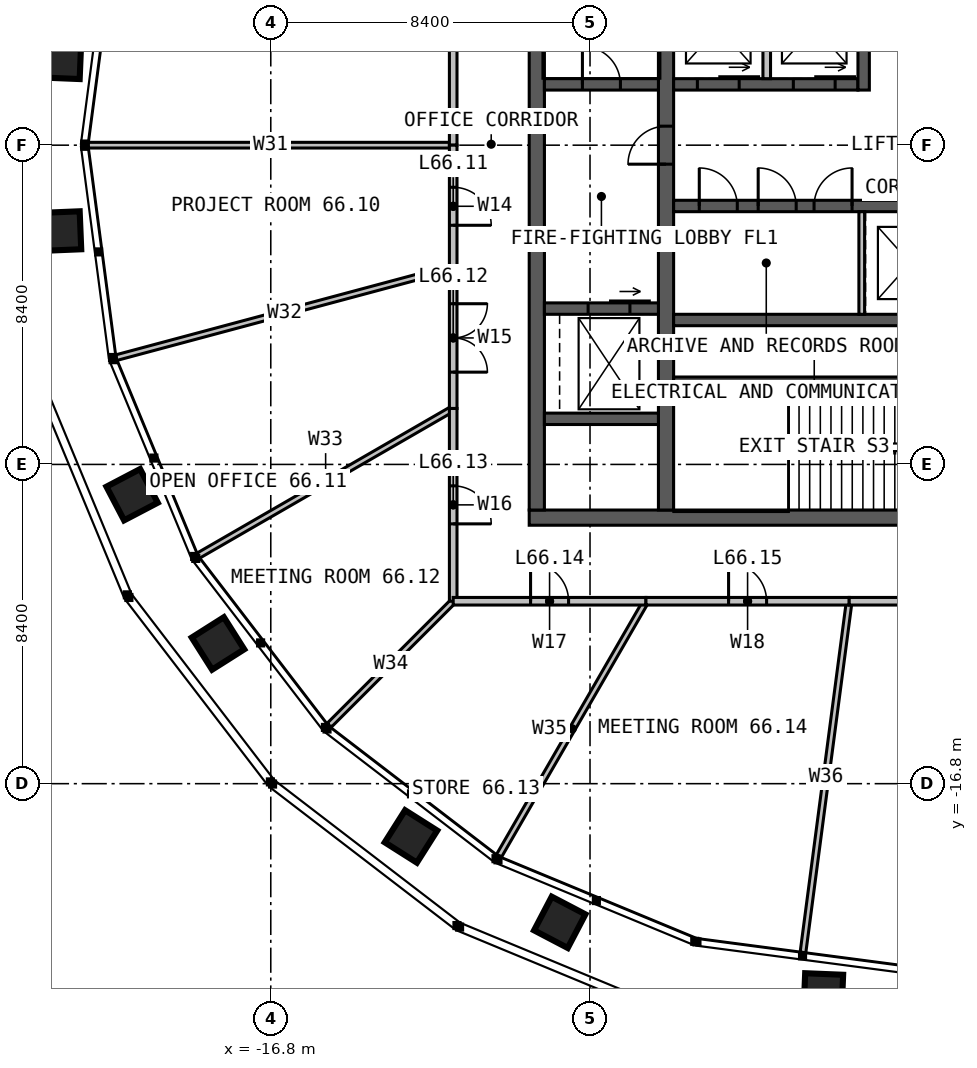
"""IFC4 building model, lengths in metres.
Left out: names, types, materials, properties, quantities, classifications, styles, units other than length and angle.
Written with IfcOpenShell. Run it as: python <this file> out.ifc"""

import sys

from ifc_helpers import new_model, si_unit, direction, frame, frame_2d, origin, place, context, subcontext, project, spatial, rectangle, extrude, element, fill, save


model = new_model("IFC4")
c1 = context("Model", 3, precision=1e-05, world=origin(), true_north=direction((0.0, 1.0)))
c2 = subcontext(c1, "Body", "Model", "MODEL_VIEW")
j1 = project(units=[si_unit("LENGTHUNIT", "METRE"), si_unit("PLANEANGLEUNIT", "RADIAN")], contexts=[c1])
p1 = place(None, origin())
s1 = spatial("IfcSite", under=j1, at=p1, CompositionType="ELEMENT")
p2 = place(p1, origin())
s2 = spatial("IfcBuilding", under=s1, at=p2, CompositionType="ELEMENT")
p3 = place(p2, frame((0.0, 0.0, 272.0)))
s3 = spatial("IfcBuildingStorey", under=s2, at=p3, CompositionType="ELEMENT", Elevation=272.0)
p4 = place(p3, frame((10.0, -9.8, 0.0), z_axis=(0.0, 0.0, 1.0), x_axis=(-1.0, 0.0, 0.0)))
e1 = element("IfcWall", 1, at=p4, inside=s3, PredefinedType="SOLIDWALL", context=c2, shape_type="SweptSolid", body=[
    extrude(rectangle(XDim=20.0, YDim=0.4, at=frame_2d((10.0, 0.0))), origin(), (0.0, 0.0, 1.0), 4.0),
])
p5 = place(p4, frame((6.875, 0.0, 0.0)))
e2 = element("IfcOpeningElement", 2, at=p5, cuts=e1, PredefinedType="OPENING", context=c2, shape_type="SweptSolid", body=[
    extrude(rectangle(XDim=1.2, YDim=2.2, at=frame_2d((0.6, 1.1))), frame((0.0, 0.21, 0.0), z_axis=(0.0, -1.0, 0.0), x_axis=(1.0, 0.0, 0.0)), (0.0, 0.0, 1.0), 0.42),
])
p6 = place(p3, frame((-9.8, 9.6, 0.0), z_axis=(0.0, 0.0, 1.0), x_axis=(0.0, -1.0, 0.0)))
e3 = element("IfcWall", 3, at=p6, inside=s3, PredefinedType="SOLIDWALL", context=c2, shape_type="SweptSolid", body=[
    extrude(rectangle(XDim=19.2, YDim=0.4, at=frame_2d((9.6, 0.0))), origin(), (0.0, 0.0, 1.0), 4.0),
])
p7 = place(p3, frame((-6.4, -9.6, 0.0), z_axis=(0.0, 0.0, 1.0), x_axis=(0.0, 1.0, 0.0)))
e4 = element("IfcWall", 4, at=p7, inside=s3, PredefinedType="SOLIDWALL", context=c2, shape_type="SweptSolid", body=[
    extrude(rectangle(XDim=19.2, YDim=0.4, at=frame_2d((9.6, 0.0))), origin(), (0.0, 0.0, 1.0), 4.0),
])
p8 = place(p7, frame((9.1, 0.0, 0.0)))
e5 = element("IfcOpeningElement", 5, at=p8, cuts=e4, PredefinedType="OPENING", context=c2, shape_type="SweptSolid", body=[
    extrude(rectangle(XDim=1.0, YDim=2.2, at=frame_2d((0.5, 1.1))), frame((0.0, 0.21, 0.0), z_axis=(0.0, -1.0, 0.0), x_axis=(1.0, 0.0, 0.0)), (0.0, 0.0, 1.0), 0.42),
])
p9 = place(p3, frame((-6.2, 1.6, 0.0), z_axis=(0.0, 0.0, 1.0), x_axis=(1.0, 0.0, 0.0)))
e6 = element("IfcWall", 6, at=p9, inside=s3, PredefinedType="SOLIDWALL", context=c2, shape_type="SweptSolid", body=[
    extrude(rectangle(XDim=4.85, YDim=0.3, at=frame_2d((2.425, 0.0))), origin(), (0.0, 0.0, 1.0), 4.0),
])
p10 = place(p9, frame((0.625, 0.0, 0.0)))
e7 = element("IfcOpeningElement", 7, at=p10, cuts=e6, PredefinedType="OPENING", context=c2, shape_type="SweptSolid", body=[
    extrude(rectangle(XDim=1.1, YDim=2.2, at=frame_2d((0.55, 1.1))), frame((0.0, 0.16, 0.0), z_axis=(0.0, -1.0, 0.0), x_axis=(1.0, 0.0, 0.0)), (0.0, 0.0, 1.0), 0.32),
])
p11 = place(p9, frame((3.15, 0.0, 0.0)))
e8 = element("IfcOpeningElement", 8, at=p11, cuts=e6, PredefinedType="OPENING", context=c2, shape_type="SweptSolid", body=[
    extrude(rectangle(XDim=1.1, YDim=2.2, at=frame_2d((0.55, 1.1))), frame((0.0, 0.16, 0.0), z_axis=(0.0, -1.0, 0.0), x_axis=(1.0, 0.0, 0.0)), (0.0, 0.0, 1.0), 0.32),
])
p12 = place(p3, frame((-1.2, 1.45, 0.0), z_axis=(0.0, 0.0, 1.0), x_axis=(0.0, 1.0, 0.0)))
e9 = element("IfcWall", 9, at=p12, inside=s3, PredefinedType="SOLIDWALL", context=c2, shape_type="SweptSolid", body=[
    extrude(rectangle(XDim=8.15, YDim=0.3, at=frame_2d((4.075, 0.0))), origin(), (0.0, 0.0, 1.0), 4.0),
])
p13 = place(p12, frame((5.05, 0.0, 0.0)))
e10 = element("IfcOpeningElement", 10, at=p13, cuts=e9, PredefinedType="OPENING", context=c2, shape_type="SweptSolid", body=[
    extrude(rectangle(XDim=1.0, YDim=2.2, at=frame_2d((0.5, 1.1))), frame((0.0, 0.16, 0.0), z_axis=(0.0, -1.0, 0.0), x_axis=(1.0, 0.0, 0.0)), (0.0, 0.0, 1.0), 0.32),
])
p14 = place(p3, frame((-6.2, -1.6, 0.0), z_axis=(0.0, 0.0, 1.0), x_axis=(1.0, 0.0, 0.0)))
e11 = element("IfcWall", 11, at=p14, inside=s3, PredefinedType="SOLIDWALL", context=c2, shape_type="SweptSolid", body=[
    extrude(rectangle(XDim=7.4, YDim=0.3, at=frame_2d((3.7, 0.0))), origin(), (0.0, 0.0, 1.0), 4.0),
])
p15 = place(p14, frame((0.675, 0.0, 0.0)))
e12 = element("IfcOpeningElement", 12, at=p15, cuts=e11, PredefinedType="OPENING", context=c2, shape_type="SweptSolid", body=[
    extrude(rectangle(XDim=1.0, YDim=2.2, at=frame_2d((0.5, 1.1))), frame((0.0, 0.16, 0.0), z_axis=(0.0, -1.0, 0.0), x_axis=(1.0, 0.0, 0.0)), (0.0, 0.0, 1.0), 0.32),
])
p16 = place(p14, frame((2.225, 0.0, 0.0)))
e13 = element("IfcOpeningElement", 13, at=p16, cuts=e11, PredefinedType="OPENING", context=c2, shape_type="SweptSolid", body=[
    extrude(rectangle(XDim=1.0, YDim=2.2, at=frame_2d((0.5, 1.1))), frame((0.0, 0.16, 0.0), z_axis=(0.0, -1.0, 0.0), x_axis=(1.0, 0.0, 0.0)), (0.0, 0.0, 1.0), 0.32),
])
p17 = place(p14, frame((3.695, 0.0, 0.0)))
e14 = element("IfcOpeningElement", 14, at=p17, cuts=e11, PredefinedType="OPENING", context=c2, shape_type="SweptSolid", body=[
    extrude(rectangle(XDim=1.0, YDim=2.2, at=frame_2d((0.5, 1.1))), frame((0.0, 0.16, 0.0), z_axis=(0.0, -1.0, 0.0), x_axis=(1.0, 0.0, 0.0)), (0.0, 0.0, 1.0), 0.32),
])
p18 = place(p3, frame((-6.2, -4.6, 0.0), z_axis=(0.0, 0.0, 1.0), x_axis=(1.0, 0.0, 0.0)))
e15 = element("IfcWall", 15, at=p18, inside=s3, PredefinedType="SOLIDWALL", context=c2, shape_type="SweptSolid", body=[
    extrude(rectangle(XDim=7.4, YDim=0.3, at=frame_2d((3.7, 0.0))), origin(), (0.0, 0.0, 1.0), 4.0),
])
p19 = place(p3, frame((-6.2, -6.2, 0.0), z_axis=(0.0, 0.0, 1.0), x_axis=(1.0, 0.0, 0.0)))
e16 = element("IfcWall", 16, at=p19, inside=s3, PredefinedType="SOLIDWALL", context=c2, shape_type="SweptSolid", body=[
    extrude(rectangle(XDim=7.4, YDim=0.2, at=frame_2d((3.7, 0.0))), origin(), (0.0, 0.0, 1.0), 4.0),
])
p20 = place(p3, frame((-9.6, 1.6, 0.0), z_axis=(0.0, 0.0, 1.0), x_axis=(1.0, 0.0, 0.0)))
e17 = element("IfcWall", 17, at=p20, inside=s3, PredefinedType="SOLIDWALL", context=c2, shape_type="SweptSolid", body=[
    extrude(rectangle(XDim=3.0, YDim=0.3, at=frame_2d((1.5, 0.0))), origin(), (0.0, 0.0, 1.0), 4.0),
])
p21 = place(p20, frame((1.0, 0.0, 0.0)))
e18 = element("IfcOpeningElement", 18, at=p21, cuts=e17, PredefinedType="OPENING", context=c2, shape_type="SweptSolid", body=[
    extrude(rectangle(XDim=1.0, YDim=2.2, at=frame_2d((0.5, 1.1))), frame((0.0, 0.16, 0.0), z_axis=(0.0, -1.0, 0.0), x_axis=(1.0, 0.0, 0.0)), (0.0, 0.0, 1.0), 0.32),
])
p22 = place(p3, frame((-9.6, -4.3, 0.0), z_axis=(0.0, 0.0, 1.0), x_axis=(1.0, 0.0, 0.0)))
e19 = element("IfcWall", 19, at=p22, inside=s3, PredefinedType="SOLIDWALL", context=c2, shape_type="SweptSolid", body=[
    extrude(rectangle(XDim=3.0, YDim=0.3, at=frame_2d((1.5, 0.0))), origin(), (0.0, 0.0, 1.0), 4.0),
])
p23 = place(p22, frame((1.15, 0.0, 0.0)))
e20 = element("IfcOpeningElement", 20, at=p23, cuts=e19, PredefinedType="OPENING", context=c2, shape_type="SweptSolid", body=[
    extrude(rectangle(XDim=1.1, YDim=2.2, at=frame_2d((0.55, 1.1))), frame((0.0, 0.16, 0.0), z_axis=(0.0, -1.0, 0.0), x_axis=(1.0, 0.0, 0.0)), (0.0, 0.0, 1.0), 0.32),
])
p24 = place(p3, frame((-9.6, -7.2, 0.0), z_axis=(0.0, 0.0, 1.0), x_axis=(1.0, 0.0, 0.0)))
e21 = element("IfcWall", 21, at=p24, inside=s3, PredefinedType="SOLIDWALL", context=c2, shape_type="SweptSolid", body=[
    extrude(rectangle(XDim=3.0, YDim=0.3, at=frame_2d((1.5, 0.0))), origin(), (0.0, 0.0, 1.0), 4.0),
])
p25 = place(p3, frame((-3.75, 1.75, 0.0), z_axis=(0.0, 0.0, 1.0), x_axis=(0.0, 1.0, 0.0)))
e22 = element("IfcWall", 22, at=p25, inside=s3, PredefinedType="SOLIDWALL", context=c2, shape_type="SweptSolid", body=[
    extrude(rectangle(XDim=2.7, YDim=0.2, at=frame_2d((1.35, 0.0))), origin(), (0.0, 0.0, 1.0), 3.75),
])
p26 = place(p3, frame((-1.25, -1.75, 0.0), z_axis=(0.0, 0.0, 1.0), x_axis=(0.0, -1.0, 0.0)))
e23 = element("IfcWall", 23, at=p26, inside=s3, PredefinedType="PARTITIONING", context=c2, shape_type="SweptSolid", body=[
    extrude(rectangle(XDim=2.7, YDim=0.15, at=frame_2d((1.35, 0.0))), origin(), (0.0, 0.0, 1.0), 3.75),
])
p27 = place(p3, frame((-12.0, 0.0, 0.0), z_axis=(0.0, 0.0, 1.0), x_axis=(-1.0, 0.0, 0.0)))
e24 = element("IfcWall", 24, at=p27, inside=s3, PredefinedType="PARTITIONING", context=c2, shape_type="SweptSolid", body=[
    extrude(rectangle(XDim=9.608, YDim=0.15, at=frame_2d((4.804, 0.0))), origin(), (0.0, 0.0, 1.0), 2.79),
])
p28 = place(p3, frame((-12.0, -3.215, 0.0), z_axis=(0.0, 0.0, 1.0), x_axis=(-0.965925864192, -0.258818903647, 0.0)))
e25 = element("IfcWall", 25, at=p28, inside=s3, PredefinedType="PARTITIONING", context=c2, shape_type="SweptSolid", body=[
    extrude(rectangle(XDim=9.185, YDim=0.15, at=frame_2d((4.592, 0.0))), origin(), (0.0, 0.0, 1.0), 2.79),
])
p29 = place(p3, frame((-12.0, -6.928, 0.0), z_axis=(0.0, 0.0, 1.0), x_axis=(-0.866025099701, -0.500000526688, 0.0)))
e26 = element("IfcWall", 26, at=p29, inside=s3, PredefinedType="PARTITIONING", context=c2, shape_type="SweptSolid", body=[
    extrude(rectangle(XDim=7.752, YDim=0.15, at=frame_2d((3.876, 0.0))), origin(), (0.0, 0.0, 1.0), 2.79),
])
p30 = place(p3, frame((-12.0, -12.0, 0.0), z_axis=(0.0, 0.0, 1.0), x_axis=(-0.707106781187, -0.707106781187, 0.0)))
e27 = element("IfcWall", 27, at=p30, inside=s3, PredefinedType="PARTITIONING", context=c2, shape_type="SweptSolid", body=[
    extrude(rectangle(XDim=4.638, YDim=0.15, at=frame_2d((2.319, 0.0))), origin(), (0.0, 0.0, 1.0), 2.79),
])
p31 = place(p3, frame((-6.928, -12.0, 0.0), z_axis=(0.0, 0.0, 1.0), x_axis=(-0.500000526688, -0.866025099701, 0.0)))
e28 = element("IfcWall", 28, at=p31, inside=s3, PredefinedType="PARTITIONING", context=c2, shape_type="SweptSolid", body=[
    extrude(rectangle(XDim=7.752, YDim=0.15, at=frame_2d((3.876, 0.0))), origin(), (0.0, 0.0, 1.0), 2.79),
])
p32 = place(p3, frame((-1.58, -12.0, 0.0), z_axis=(0.0, 0.0, 1.0), x_axis=(-0.13053515118, -0.991443681863, 0.0)))
e29 = element("IfcWall", 29, at=p32, inside=s3, PredefinedType="PARTITIONING", context=c2, shape_type="SweptSolid", body=[
    extrude(rectangle(XDim=9.32, YDim=0.15, at=frame_2d((4.66, 0.0))), origin(), (0.0, 0.0, 1.0), 2.79),
])
p33 = place(p3, frame((-12.0, 6.928, 0.0), z_axis=(0.0, 0.0, 1.0), x_axis=(0.0, -1.0, 0.0)))
e30 = element("IfcWall", 30, at=p33, inside=s3, PredefinedType="PARTITIONING", context=c2, shape_type="SweptSolid", body=[
    extrude(rectangle(XDim=6.928, YDim=0.2, at=frame_2d((3.464, 0.0))), origin(), (0.0, 0.0, 1.0), 3.8),
])
p34 = place(p33, frame((2.564, 0.0, 0.0)))
e31 = element("IfcOpeningElement", 31, at=p34, cuts=e30, PredefinedType="OPENING", context=c2, shape_type="SweptSolid", body=[
    extrude(rectangle(XDim=1.8, YDim=2.2, at=frame_2d((0.9, 1.1))), frame((0.0, 0.11, 0.0), z_axis=(0.0, -1.0, 0.0), x_axis=(1.0, 0.0, 0.0)), (0.0, 0.0, 1.0), 0.22),
])
p35 = place(p3, frame((-12.0, 0.0, 0.0), z_axis=(0.0, 0.0, 1.0), x_axis=(0.0, -1.0, 0.0)))
e32 = element("IfcWall", 32, at=p35, inside=s3, PredefinedType="PARTITIONING", context=c2, shape_type="SweptSolid", body=[
    extrude(rectangle(XDim=3.215, YDim=0.2, at=frame_2d((1.608, 0.0))), origin(), (0.0, 0.0, 1.0), 3.8),
])
p36 = place(p35, frame((1.108, 0.0, 0.0)))
e33 = element("IfcOpeningElement", 33, at=p36, cuts=e32, PredefinedType="OPENING", context=c2, shape_type="SweptSolid", body=[
    extrude(rectangle(XDim=1.0, YDim=2.2, at=frame_2d((0.5, 1.1))), frame((0.0, 0.11, 0.0), z_axis=(0.0, -1.0, 0.0), x_axis=(1.0, 0.0, 0.0)), (0.0, 0.0, 1.0), 0.22),
])
p37 = place(p3, frame((-12.0, -3.215, 0.0), z_axis=(0.0, 0.0, 1.0), x_axis=(0.0, -1.0, 0.0)))
e34 = element("IfcWall", 34, at=p37, inside=s3, PredefinedType="PARTITIONING", context=c2, shape_type="SweptSolid", body=[
    extrude(rectangle(XDim=3.713, YDim=0.2, at=frame_2d((1.856, 0.0))), origin(), (0.0, 0.0, 1.0), 3.8),
])
p38 = place(p37, frame((0.956, 0.0, 0.0)))
e35 = element("IfcOpeningElement", 35, at=p38, cuts=e34, PredefinedType="OPENING", context=c2, shape_type="SweptSolid", body=[
    extrude(rectangle(XDim=1.8, YDim=2.2, at=frame_2d((0.9, 1.1))), frame((0.0, 0.11, 0.0), z_axis=(0.0, -1.0, 0.0), x_axis=(1.0, 0.0, 0.0)), (0.0, 0.0, 1.0), 0.22),
])
p39 = place(p3, frame((-12.0, -6.928, 0.0), z_axis=(0.0, 0.0, 1.0), x_axis=(0.0, -1.0, 0.0)))
e36 = element("IfcWall", 36, at=p39, inside=s3, PredefinedType="PARTITIONING", context=c2, shape_type="SweptSolid", body=[
    extrude(rectangle(XDim=5.072, YDim=0.2, at=frame_2d((2.536, 0.0))), origin(), (0.0, 0.0, 1.0), 3.8),
])
p40 = place(p39, frame((2.036, 0.0, 0.0)))
e37 = element("IfcOpeningElement", 37, at=p40, cuts=e36, PredefinedType="OPENING", context=c2, shape_type="SweptSolid", body=[
    extrude(rectangle(XDim=1.0, YDim=2.2, at=frame_2d((0.5, 1.1))), frame((0.0, 0.11, 0.0), z_axis=(0.0, -1.0, 0.0), x_axis=(1.0, 0.0, 0.0)), (0.0, 0.0, 1.0), 0.22),
])
p41 = place(p3, frame((-12.0, -12.0, 0.0), z_axis=(0.0, 0.0, 1.0), x_axis=(1.0, 0.0, 0.0)))
e38 = element("IfcWall", 38, at=p41, inside=s3, PredefinedType="PARTITIONING", context=c2, shape_type="SweptSolid", body=[
    extrude(rectangle(XDim=5.072, YDim=0.2, at=frame_2d((2.536, 0.0))), origin(), (0.0, 0.0, 1.0), 3.8),
])
p42 = place(p41, frame((2.036, 0.0, 0.0)))
e39 = element("IfcOpeningElement", 39, at=p42, cuts=e38, PredefinedType="OPENING", context=c2, shape_type="SweptSolid", body=[
    extrude(rectangle(XDim=1.0, YDim=2.2, at=frame_2d((0.5, 1.1))), frame((0.0, 0.11, 0.0), z_axis=(0.0, -1.0, 0.0), x_axis=(1.0, 0.0, 0.0)), (0.0, 0.0, 1.0), 0.22),
])
p43 = place(p3, frame((-6.928, -12.0, 0.0), z_axis=(0.0, 0.0, 1.0), x_axis=(1.0, 0.0, 0.0)))
e40 = element("IfcWall", 40, at=p43, inside=s3, PredefinedType="PARTITIONING", context=c2, shape_type="SweptSolid", body=[
    extrude(rectangle(XDim=5.348, YDim=0.2, at=frame_2d((2.674, 0.0))), origin(), (0.0, 0.0, 1.0), 3.8),
])
p44 = place(p43, frame((2.174, 0.0, 0.0)))
e41 = element("IfcOpeningElement", 41, at=p44, cuts=e40, PredefinedType="OPENING", context=c2, shape_type="SweptSolid", body=[
    extrude(rectangle(XDim=1.0, YDim=2.2, at=frame_2d((0.5, 1.1))), frame((0.0, 0.11, 0.0), z_axis=(0.0, -1.0, 0.0), x_axis=(1.0, 0.0, 0.0)), (0.0, 0.0, 1.0), 0.22),
])
p45 = place(p3, frame((-1.58, -12.0, 0.0), z_axis=(0.0, 0.0, 1.0), x_axis=(1.0, 0.0, 0.0)))
e42 = element("IfcWall", 42, at=p45, inside=s3, PredefinedType="PARTITIONING", context=c2, shape_type="SweptSolid", body=[
    extrude(rectangle(XDim=8.508, YDim=0.2, at=frame_2d((4.254, 0.0))), origin(), (0.0, 0.0, 1.0), 3.8),
])
p46 = place(p45, frame((3.354, 0.0, 0.0)))
e43 = element("IfcOpeningElement", 43, at=p46, cuts=e42, PredefinedType="OPENING", context=c2, shape_type="SweptSolid", body=[
    extrude(rectangle(XDim=1.8, YDim=2.2, at=frame_2d((0.9, 1.1))), frame((0.0, 0.11, 0.0), z_axis=(0.0, -1.0, 0.0), x_axis=(1.0, 0.0, 0.0)), (0.0, 0.0, 1.0), 0.22),
])
p47 = place(p8, origin())
e44 = element("IfcDoor", 44, at=p47, inside=s3, OperationType="SINGLE_SWING_LEFT", PredefinedType="DOOR", context=c2, shape_type="SweptSolid", body=[
    extrude(rectangle(XDim=1.0, YDim=2.2, at=frame_2d((0.5, 1.1))), frame((0.0, 0.025, 0.0), z_axis=(0.0, -1.0, 0.0), x_axis=(1.0, 0.0, 0.0)), (0.0, 0.0, 1.0), 0.05),
])
fill(e5, e44)
p48 = place(p21, origin())
e45 = element("IfcDoor", 45, at=p48, inside=s3, OperationType="SINGLE_SWING_LEFT", PredefinedType="DOOR", context=c2, shape_type="SweptSolid", body=[
    extrude(rectangle(XDim=1.0, YDim=2.2, at=frame_2d((0.5, 1.1))), frame((0.0, 0.025, 0.0), z_axis=(0.0, -1.0, 0.0), x_axis=(1.0, 0.0, 0.0)), (0.0, 0.0, 1.0), 0.05),
])
fill(e18, e45)
p49 = place(p15, origin())
e46 = element("IfcDoor", 46, at=p49, inside=s3, OperationType="SINGLE_SWING_LEFT", PredefinedType="DOOR", context=c2, shape_type="SweptSolid", body=[
    extrude(rectangle(XDim=1.0, YDim=2.2, at=frame_2d((0.5, 1.1))), frame((0.0, 0.025, 0.0), z_axis=(0.0, -1.0, 0.0), x_axis=(1.0, 0.0, 0.0)), (0.0, 0.0, 1.0), 0.05),
])
fill(e12, e46)
p50 = place(p16, origin())
e47 = element("IfcDoor", 47, at=p50, inside=s3, OperationType="SINGLE_SWING_LEFT", PredefinedType="DOOR", context=c2, shape_type="SweptSolid", body=[
    extrude(rectangle(XDim=1.0, YDim=2.2, at=frame_2d((0.5, 1.1))), frame((0.0, 0.025, 0.0), z_axis=(0.0, -1.0, 0.0), x_axis=(1.0, 0.0, 0.0)), (0.0, 0.0, 1.0), 0.05),
])
fill(e13, e47)
p51 = place(p17, origin())
e48 = element("IfcDoor", 48, at=p51, inside=s3, OperationType="SINGLE_SWING_RIGHT", PredefinedType="DOOR", context=c2, shape_type="SweptSolid", body=[
    extrude(rectangle(XDim=1.0, YDim=2.2, at=frame_2d((0.5, 1.1))), frame((0.0, 0.025, 0.0), z_axis=(0.0, -1.0, 0.0), x_axis=(1.0, 0.0, 0.0)), (0.0, 0.0, 1.0), 0.05),
])
fill(e14, e48)
p52 = place(p10, origin())
e49 = element("IfcDoor", 49, at=p52, inside=s3, OperationType="SLIDING_TO_LEFT", PredefinedType="DOOR", context=c2, shape_type="SweptSolid", body=[
    extrude(rectangle(XDim=1.1, YDim=2.2, at=frame_2d((0.55, 1.1))), frame((0.0, 0.025, 0.0), z_axis=(0.0, -1.0, 0.0), x_axis=(1.0, 0.0, 0.0)), (0.0, 0.0, 1.0), 0.05),
])
fill(e7, e49)
p53 = place(p11, origin())
e50 = element("IfcDoor", 50, at=p53, inside=s3, OperationType="SLIDING_TO_LEFT", PredefinedType="DOOR", context=c2, shape_type="SweptSolid", body=[
    extrude(rectangle(XDim=1.1, YDim=2.2, at=frame_2d((0.55, 1.1))), frame((0.0, 0.025, 0.0), z_axis=(0.0, -1.0, 0.0), x_axis=(1.0, 0.0, 0.0)), (0.0, 0.0, 1.0), 0.05),
])
fill(e8, e50)
p54 = place(p23, origin())
e51 = element("IfcDoor", 51, at=p54, inside=s3, OperationType="SLIDING_TO_LEFT", PredefinedType="DOOR", context=c2, shape_type="SweptSolid", body=[
    extrude(rectangle(XDim=1.1, YDim=2.2, at=frame_2d((0.55, 1.1))), frame((0.0, 0.025, 0.0), z_axis=(0.0, -1.0, 0.0), x_axis=(1.0, 0.0, 0.0)), (0.0, 0.0, 1.0), 0.05),
])
fill(e20, e51)
p55 = place(p36, origin())
e52 = element("IfcDoor", 52, at=p55, inside=s3, OperationType="SINGLE_SWING_RIGHT", PredefinedType="DOOR", context=c2, shape_type="SweptSolid", body=[
    extrude(rectangle(XDim=1.0, YDim=2.2, at=frame_2d((0.5, 1.1))), frame((0.0, 0.025, 0.0), z_axis=(0.0, -1.0, 0.0), x_axis=(1.0, 0.0, 0.0)), (0.0, 0.0, 1.0), 0.05),
])
fill(e33, e52)
p56 = place(p38, origin())
e53 = element("IfcDoor", 53, at=p56, inside=s3, OperationType="DOUBLE_DOOR_SINGLE_SWING", PredefinedType="DOOR", context=c2, shape_type="SweptSolid", body=[
    extrude(rectangle(XDim=1.8, YDim=2.2, at=frame_2d((0.9, 1.1))), frame((0.0, 0.025, 0.0), z_axis=(0.0, -1.0, 0.0), x_axis=(1.0, 0.0, 0.0)), (0.0, 0.0, 1.0), 0.05),
])
fill(e35, e53)
p57 = place(p40, origin())
e54 = element("IfcDoor", 54, at=p57, inside=s3, OperationType="SINGLE_SWING_RIGHT", PredefinedType="DOOR", context=c2, shape_type="SweptSolid", body=[
    extrude(rectangle(XDim=1.0, YDim=2.2, at=frame_2d((0.5, 1.1))), frame((0.0, 0.025, 0.0), z_axis=(0.0, -1.0, 0.0), x_axis=(1.0, 0.0, 0.0)), (0.0, 0.0, 1.0), 0.05),
])
fill(e37, e54)
p58 = place(p42, origin())
e55 = element("IfcDoor", 55, at=p58, inside=s3, OperationType="SINGLE_SWING_LEFT", PredefinedType="DOOR", context=c2, shape_type="SweptSolid", body=[
    extrude(rectangle(XDim=1.0, YDim=2.2, at=frame_2d((0.5, 1.1))), frame((0.0, 0.025, 0.0), z_axis=(0.0, -1.0, 0.0), x_axis=(1.0, 0.0, 0.0)), (0.0, 0.0, 1.0), 0.05),
])
fill(e39, e55)
p59 = place(p44, origin())
e56 = element("IfcDoor", 56, at=p59, inside=s3, OperationType="SINGLE_SWING_LEFT", PredefinedType="DOOR", context=c2, shape_type="SweptSolid", body=[
    extrude(rectangle(XDim=1.0, YDim=2.2, at=frame_2d((0.5, 1.1))), frame((0.0, 0.025, 0.0), z_axis=(0.0, -1.0, 0.0), x_axis=(1.0, 0.0, 0.0)), (0.0, 0.0, 1.0), 0.05),
])
fill(e41, e56)
save(model, sys.argv[1])
